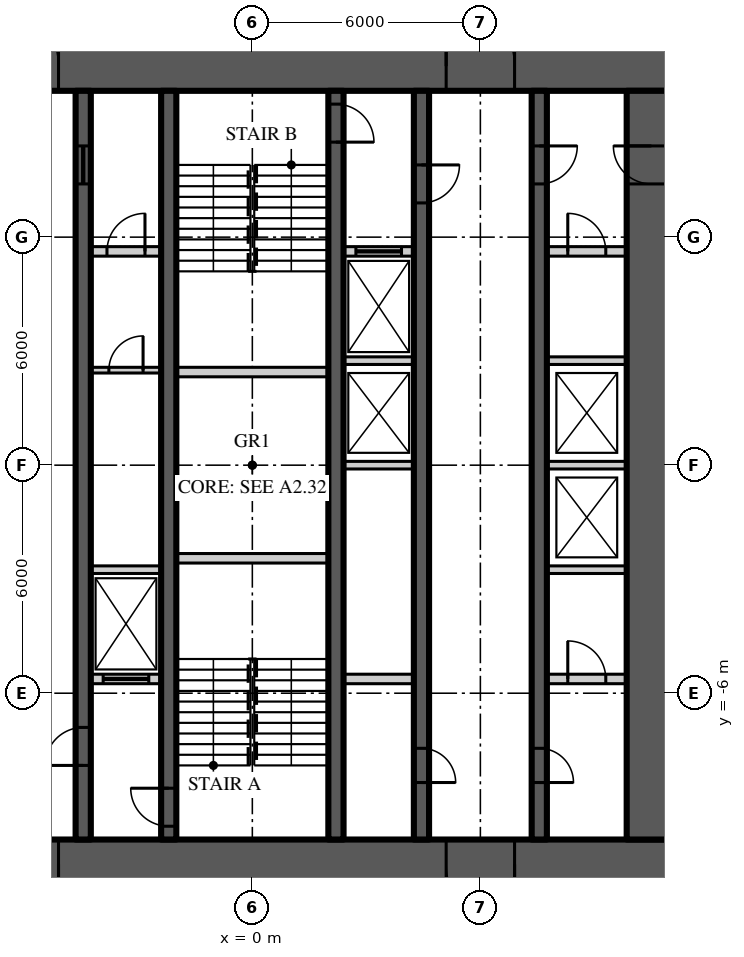
"""IFC4 building model, lengths in metres.
Left out: names, types, materials, properties, quantities, classifications, styles, units other than length and angle.
Written with IfcOpenShell. Run it as: python <this file> out.ifc"""

import sys

from ifc_helpers import new_model, si_unit, direction, frame, frame_2d, origin, place, context, subcontext, project, spatial, rectangle, extrude, element, fill, save


model = new_model("IFC4")
c1 = context("Model", 3, precision=1e-05, world=origin(), true_north=direction((0.0, 1.0)))
c2 = subcontext(c1, "Body", "Model", "MODEL_VIEW")
j1 = project(units=[si_unit("LENGTHUNIT", "METRE"), si_unit("PLANEANGLEUNIT", "RADIAN")], contexts=[c1])
p1 = place(None, origin())
s1 = spatial("IfcSite", under=j1, at=p1, CompositionType="ELEMENT")
p2 = place(p1, origin())
s2 = spatial("IfcBuilding", under=s1, at=p2, CompositionType="ELEMENT")
p3 = place(p2, frame((0.0, 0.0, 240.0)))
s3 = spatial("IfcBuildingStorey", under=s2, at=p3, CompositionType="ELEMENT", Elevation=240.0)
p4 = place(p3, frame((-11.15, 10.5, 0.0), z_axis=(0.0, 0.0, 1.0), x_axis=(1.0, 0.0, 0.0)))
e1 = element("IfcWall", 1, at=p4, inside=s3, PredefinedType="SHEAR", context=c2, shape_type="SweptSolid", body=[
    extrude(rectangle(XDim=22.3, YDim=1.3, at=frame_2d((11.15, 0.0))), origin(), (0.0, 0.0, 1.0), 3.9),
])
p5 = place(p4, frame((4.25, 0.0, 0.0)))
e2 = element("IfcOpeningElement", 2, at=p5, cuts=e1, PredefinedType="OPENING", context=c2, shape_type="SweptSolid", body=[
    extrude(rectangle(XDim=1.8, YDim=2.2, at=frame_2d((0.9, 1.1))), frame((0.0, 0.66, 0.0), z_axis=(0.0, -1.0, 0.0), x_axis=(1.0, 0.0, 0.0)), (0.0, 0.0, 1.0), 1.32),
])
p6 = place(p4, frame((16.25, 0.0, 0.0)))
e3 = element("IfcOpeningElement", 3, at=p6, cuts=e1, PredefinedType="OPENING", context=c2, shape_type="SweptSolid", body=[
    extrude(rectangle(XDim=1.8, YDim=2.2, at=frame_2d((0.9, 1.1))), frame((0.0, 0.66, 0.0), z_axis=(0.0, -1.0, 0.0), x_axis=(1.0, 0.0, 0.0)), (0.0, 0.0, 1.0), 1.32),
])
p7 = place(p3, frame((11.15, -10.5, 0.0), z_axis=(0.0, 0.0, 1.0), x_axis=(-1.0, 0.0, 0.0)))
e4 = element("IfcWall", 4, at=p7, inside=s3, PredefinedType="SHEAR", context=c2, shape_type="SweptSolid", body=[
    extrude(rectangle(XDim=22.3, YDim=1.3, at=frame_2d((11.15, 0.0))), origin(), (0.0, 0.0, 1.0), 3.9),
])
p8 = place(p7, frame((16.25, 0.0, 0.0)))
e5 = element("IfcOpeningElement", 5, at=p8, cuts=e4, PredefinedType="OPENING", context=c2, shape_type="SweptSolid", body=[
    extrude(rectangle(XDim=1.8, YDim=2.2, at=frame_2d((0.9, 1.1))), frame((0.0, 0.66, 0.0), z_axis=(0.0, -1.0, 0.0), x_axis=(1.0, 0.0, 0.0)), (0.0, 0.0, 1.0), 1.32),
])
p9 = place(p7, frame((4.25, 0.0, 0.0)))
e6 = element("IfcOpeningElement", 6, at=p9, cuts=e4, PredefinedType="OPENING", context=c2, shape_type="SweptSolid", body=[
    extrude(rectangle(XDim=1.8, YDim=2.2, at=frame_2d((0.9, 1.1))), frame((0.0, 0.66, 0.0), z_axis=(0.0, -1.0, 0.0), x_axis=(1.0, 0.0, 0.0)), (0.0, 0.0, 1.0), 1.32),
])
p10 = place(p3, frame((10.5, -9.85, 0.0), z_axis=(0.0, 0.0, 1.0), x_axis=(0.0, 1.0, 0.0)))
e7 = element("IfcWall", 7, at=p10, inside=s3, PredefinedType="SHEAR", context=c2, shape_type="SweptSolid", body=[
    extrude(rectangle(XDim=19.7, YDim=1.3, at=frame_2d((9.85, 0.0))), origin(), (0.0, 0.0, 1.0), 3.9),
])
p11 = place(p10, frame((17.25, 0.0, 0.0)))
e8 = element("IfcOpeningElement", 8, at=p11, cuts=e7, PredefinedType="OPENING", context=c2, shape_type="SweptSolid", body=[
    extrude(rectangle(XDim=1.0, YDim=2.2, at=frame_2d((0.5, 1.1))), frame((0.0, 0.66, 0.0), z_axis=(0.0, -1.0, 0.0), x_axis=(1.0, 0.0, 0.0)), (0.0, 0.0, 1.0), 1.32),
])
p12 = place(p3, frame((7.55, 9.85, 0.0), z_axis=(0.0, 0.0, 1.0), x_axis=(0.0, -1.0, 0.0)))
e9 = element("IfcWall", 9, at=p12, inside=s3, PredefinedType="SHEAR", context=c2, shape_type="SweptSolid", body=[
    extrude(rectangle(XDim=19.7, YDim=0.4, at=frame_2d((9.85, 0.0))), origin(), (0.0, 0.0, 1.0), 3.9),
])
p13 = place(p12, frame((1.45, 0.0, 0.0)))
e10 = element("IfcOpeningElement", 10, at=p13, cuts=e9, PredefinedType="OPENING", context=c2, shape_type="SweptSolid", body=[
    extrude(rectangle(XDim=1.0, YDim=2.2, at=frame_2d((0.5, 1.1))), frame((0.0, 0.21, 0.0), z_axis=(0.0, -1.0, 0.0), x_axis=(1.0, 0.0, 0.0)), (0.0, 0.0, 1.0), 0.42),
])
p14 = place(p12, frame((17.3, 0.0, 0.0)))
e11 = element("IfcOpeningElement", 11, at=p14, cuts=e9, PredefinedType="OPENING", context=c2, shape_type="SweptSolid", body=[
    extrude(rectangle(XDim=0.9, YDim=2.1, at=frame_2d((0.45, 1.05))), frame((0.0, 0.21, 0.0), z_axis=(0.0, -1.0, 0.0), x_axis=(1.0, 0.0, 0.0)), (0.0, 0.0, 1.0), 0.42),
])
p15 = place(p3, frame((-4.45, -9.85, 0.0), z_axis=(0.0, 0.0, 1.0), x_axis=(0.0, 1.0, 0.0)))
e12 = element("IfcWall", 12, at=p15, inside=s3, PredefinedType="SHEAR", context=c2, shape_type="SweptSolid", body=[
    extrude(rectangle(XDim=19.7, YDim=0.4, at=frame_2d((9.85, 0.0))), origin(), (0.0, 0.0, 1.0), 3.9),
])
p16 = place(p15, frame((1.95, 0.0, 0.0)))
e13 = element("IfcOpeningElement", 13, at=p16, cuts=e12, PredefinedType="OPENING", context=c2, shape_type="SweptSolid", body=[
    extrude(rectangle(XDim=1.0, YDim=2.2, at=frame_2d((0.5, 1.1))), frame((0.0, 0.21, 0.0), z_axis=(0.0, -1.0, 0.0), x_axis=(1.0, 0.0, 0.0)), (0.0, 0.0, 1.0), 0.42),
])
p17 = place(p15, frame((17.25, 0.0, 0.0)))
e14 = element("IfcOpeningElement", 14, at=p17, cuts=e12, PredefinedType="OPENING", context=c2, shape_type="SweptSolid", body=[
    extrude(rectangle(XDim=1.0, YDim=2.1, at=frame_2d((0.5, 1.05))), frame((0.0, 0.21, 0.0), z_axis=(0.0, -1.0, 0.0), x_axis=(1.0, 0.0, 0.0)), (0.0, 0.0, 1.0), 0.42),
])
p18 = place(p3, frame((4.45, 9.85, 0.0), z_axis=(0.0, 0.0, 1.0), x_axis=(0.0, -1.0, 0.0)))
e15 = element("IfcWall", 15, at=p18, inside=s3, PredefinedType="SHEAR", context=c2, shape_type="SweptSolid", body=[
    extrude(rectangle(XDim=19.7, YDim=0.4, at=frame_2d((9.85, 0.0))), origin(), (0.0, 0.0, 1.0), 3.9),
])
p19 = place(p18, frame((1.95, 0.0, 0.0)))
e16 = element("IfcOpeningElement", 16, at=p19, cuts=e15, PredefinedType="OPENING", context=c2, shape_type="SweptSolid", body=[
    extrude(rectangle(XDim=1.0, YDim=2.2, at=frame_2d((0.5, 1.1))), frame((0.0, 0.21, 0.0), z_axis=(0.0, -1.0, 0.0), x_axis=(1.0, 0.0, 0.0)), (0.0, 0.0, 1.0), 0.42),
])
p20 = place(p18, frame((17.3, 0.0, 0.0)))
e17 = element("IfcOpeningElement", 17, at=p20, cuts=e15, PredefinedType="OPENING", context=c2, shape_type="SweptSolid", body=[
    extrude(rectangle(XDim=0.9, YDim=2.1, at=frame_2d((0.45, 1.05))), frame((0.0, 0.21, 0.0), z_axis=(0.0, -1.0, 0.0), x_axis=(1.0, 0.0, 0.0)), (0.0, 0.0, 1.0), 0.42),
])
p21 = place(p3, frame((-2.2, -9.85, 0.0), z_axis=(0.0, 0.0, 1.0), x_axis=(0.0, 1.0, 0.0)))
e18 = element("IfcWall", 18, at=p21, inside=s3, PredefinedType="SHEAR", context=c2, shape_type="SweptSolid", body=[
    extrude(rectangle(XDim=19.7, YDim=0.4, at=frame_2d((9.85, 0.0))), origin(), (0.0, 0.0, 1.0), 3.9),
])
p22 = place(p21, frame((0.35, 0.0, 0.0)))
e19 = element("IfcOpeningElement", 19, at=p22, cuts=e18, PredefinedType="OPENING", context=c2, shape_type="SweptSolid", body=[
    extrude(rectangle(XDim=1.0, YDim=2.2, at=frame_2d((0.5, 1.1))), frame((0.0, 0.21, 0.0), z_axis=(0.0, -1.0, 0.0), x_axis=(1.0, 0.0, 0.0)), (0.0, 0.0, 1.0), 0.42),
])
p23 = place(p3, frame((2.2, 9.85, 0.0), z_axis=(0.0, 0.0, 1.0), x_axis=(0.0, -1.0, 0.0)))
e20 = element("IfcWall", 20, at=p23, inside=s3, PredefinedType="SHEAR", context=c2, shape_type="SweptSolid", body=[
    extrude(rectangle(XDim=19.7, YDim=0.4, at=frame_2d((9.85, 0.0))), origin(), (0.0, 0.0, 1.0), 3.9),
])
p24 = place(p23, frame((0.35, 0.0, 0.0)))
e21 = element("IfcOpeningElement", 21, at=p24, cuts=e20, PredefinedType="OPENING", context=c2, shape_type="SweptSolid", body=[
    extrude(rectangle(XDim=1.0, YDim=2.2, at=frame_2d((0.5, 1.1))), frame((0.0, 0.21, 0.0), z_axis=(0.0, -1.0, 0.0), x_axis=(1.0, 0.0, 0.0)), (0.0, 0.0, 1.0), 0.42),
])
p25 = place(p3, frame((-4.25, 5.625, 0.0), z_axis=(0.0, 0.0, 1.0), x_axis=(1.0, 0.0, 0.0)))
e22 = element("IfcWall", 22, at=p25, inside=s3, PredefinedType="SOLIDWALL", context=c2, shape_type="SweptSolid", body=[
    extrude(rectangle(XDim=1.85, YDim=0.25, at=frame_2d((0.925, 0.0))), origin(), (0.0, 0.0, 1.0), 3.7),
])
p26 = place(p25, frame((0.425, 0.0, 0.0)))
e23 = element("IfcOpeningElement", 23, at=p26, cuts=e22, PredefinedType="OPENING", context=c2, shape_type="SweptSolid", body=[
    extrude(rectangle(XDim=1.0, YDim=2.2, at=frame_2d((0.5, 1.1))), frame((0.0, 0.135, 0.0), z_axis=(0.0, -1.0, 0.0), x_axis=(1.0, 0.0, 0.0)), (0.0, 0.0, 1.0), 0.27),
])
p27 = place(p3, frame((2.4, 5.625, 0.0), z_axis=(0.0, 0.0, 1.0), x_axis=(1.0, 0.0, 0.0)))
e24 = element("IfcWall", 24, at=p27, inside=s3, PredefinedType="SOLIDWALL", context=c2, shape_type="SweptSolid", body=[
    extrude(rectangle(XDim=1.85, YDim=0.25, at=frame_2d((0.925, 0.0))), origin(), (0.0, 0.0, 1.0), 3.7),
])
p28 = place(p27, frame((0.325, 0.0, 0.0)))
e25 = element("IfcOpeningElement", 25, at=p28, cuts=e24, PredefinedType="OPENING", context=c2, shape_type="SweptSolid", body=[
    extrude(rectangle(XDim=1.2, YDim=2.2, at=frame_2d((0.6, 1.1))), frame((0.0, 0.135, 0.0), z_axis=(0.0, -1.0, 0.0), x_axis=(1.0, 0.0, 0.0)), (0.0, 0.0, 1.0), 0.27),
])
p29 = place(p3, frame((7.75, 5.625, 0.0), z_axis=(0.0, 0.0, 1.0), x_axis=(1.0, 0.0, 0.0)))
e26 = element("IfcWall", 26, at=p29, inside=s3, PredefinedType="SOLIDWALL", context=c2, shape_type="SweptSolid", body=[
    extrude(rectangle(XDim=2.1, YDim=0.25, at=frame_2d((1.05, 0.0))), origin(), (0.0, 0.0, 1.0), 3.7),
])
p30 = place(p29, frame((0.55, 0.0, 0.0)))
e27 = element("IfcOpeningElement", 27, at=p30, cuts=e26, PredefinedType="OPENING", context=c2, shape_type="SweptSolid", body=[
    extrude(rectangle(XDim=1.0, YDim=2.2, at=frame_2d((0.5, 1.1))), frame((0.0, 0.135, 0.0), z_axis=(0.0, -1.0, 0.0), x_axis=(1.0, 0.0, 0.0)), (0.0, 0.0, 1.0), 0.27),
])
p31 = place(p3, frame((-4.25, -5.625, 0.0), z_axis=(0.0, 0.0, 1.0), x_axis=(1.0, 0.0, 0.0)))
e28 = element("IfcWall", 28, at=p31, inside=s3, PredefinedType="SOLIDWALL", context=c2, shape_type="SweptSolid", body=[
    extrude(rectangle(XDim=1.85, YDim=0.25, at=frame_2d((0.925, 0.0))), origin(), (0.0, 0.0, 1.0), 3.7),
])
p32 = place(p31, frame((0.325, 0.0, 0.0)))
e29 = element("IfcOpeningElement", 29, at=p32, cuts=e28, PredefinedType="OPENING", context=c2, shape_type="SweptSolid", body=[
    extrude(rectangle(XDim=1.2, YDim=2.2, at=frame_2d((0.6, 1.1))), frame((0.0, 0.135, 0.0), z_axis=(0.0, -1.0, 0.0), x_axis=(1.0, 0.0, 0.0)), (0.0, 0.0, 1.0), 0.27),
])
p33 = place(p3, frame((2.4, -5.625, 0.0), z_axis=(0.0, 0.0, 1.0), x_axis=(1.0, 0.0, 0.0)))
e30 = element("IfcWall", 30, at=p33, inside=s3, PredefinedType="SOLIDWALL", context=c2, shape_type="SweptSolid", body=[
    extrude(rectangle(XDim=1.85, YDim=0.25, at=frame_2d((0.925, 0.0))), origin(), (0.0, 0.0, 1.0), 3.7),
])
p34 = place(p3, frame((7.75, -5.625, 0.0), z_axis=(0.0, 0.0, 1.0), x_axis=(1.0, 0.0, 0.0)))
e31 = element("IfcWall", 31, at=p34, inside=s3, PredefinedType="SOLIDWALL", context=c2, shape_type="SweptSolid", body=[
    extrude(rectangle(XDim=2.1, YDim=0.25, at=frame_2d((1.05, 0.0))), origin(), (0.0, 0.0, 1.0), 3.7),
])
p35 = place(p34, frame((0.55, 0.0, 0.0)))
e32 = element("IfcOpeningElement", 32, at=p35, cuts=e31, PredefinedType="OPENING", context=c2, shape_type="SweptSolid", body=[
    extrude(rectangle(XDim=1.0, YDim=2.2, at=frame_2d((0.5, 1.1))), frame((0.0, 0.135, 0.0), z_axis=(0.0, -1.0, 0.0), x_axis=(1.0, 0.0, 0.0)), (0.0, 0.0, 1.0), 0.27),
])
for number, where, z_axis, x_axis in (
    (33, (-2.0, -2.45, 0.0), (0.0, 0.0, 1.0), (1.0, 0.0, 0.0)),
    (34, (-2.0, 2.45, 0.0), (0.0, 0.0, 1.0), (1.0, 0.0, 0.0)),
):
    element("IfcWall", number, at=place(p3, frame(where, z_axis=z_axis, x_axis=x_axis)), inside=s3, PredefinedType="SOLIDWALL", context=c2, shape_type="SweptSolid", body=[
        extrude(rectangle(XDim=4.0, YDim=0.25, at=frame_2d((2.0, 0.0))), origin(), (0.0, 0.0, 1.0), 3.7),
    ])
p36 = place(p3, frame((-4.25, -2.75, 0.0), z_axis=(0.0, 0.0, 1.0), x_axis=(1.0, 0.0, 0.0)))
e35 = element("IfcWall", 35, at=p36, inside=s3, PredefinedType="SOLIDWALL", context=c2, shape_type="SweptSolid", body=[
    extrude(rectangle(XDim=1.85, YDim=0.2, at=frame_2d((0.925, 0.0))), origin(), (0.0, 0.0, 1.0), 3.7),
])
p37 = place(p3, frame((7.75, -2.75, 0.0), z_axis=(0.0, 0.0, 1.0), x_axis=(1.0, 0.0, 0.0)))
e36 = element("IfcWall", 36, at=p37, inside=s3, PredefinedType="SOLIDWALL", context=c2, shape_type="SweptSolid", body=[
    extrude(rectangle(XDim=2.1, YDim=0.2, at=frame_2d((1.05, 0.0))), origin(), (0.0, 0.0, 1.0), 3.7),
])
p38 = place(p3, frame((2.4, 0.0, 0.0), z_axis=(0.0, 0.0, 1.0), x_axis=(1.0, 0.0, 0.0)))
e37 = element("IfcWall", 37, at=p38, inside=s3, PredefinedType="SOLIDWALL", context=c2, shape_type="SweptSolid", body=[
    extrude(rectangle(XDim=1.85, YDim=0.2, at=frame_2d((0.925, 0.0))), origin(), (0.0, 0.0, 1.0), 3.7),
])
p39 = place(p3, frame((7.75, 0.0, 0.0), z_axis=(0.0, 0.0, 1.0), x_axis=(1.0, 0.0, 0.0)))
e38 = element("IfcWall", 38, at=p39, inside=s3, PredefinedType="SOLIDWALL", context=c2, shape_type="SweptSolid", body=[
    extrude(rectangle(XDim=2.1, YDim=0.2, at=frame_2d((1.05, 0.0))), origin(), (0.0, 0.0, 1.0), 3.7),
])
p40 = place(p3, frame((2.4, 2.75, 0.0), z_axis=(0.0, 0.0, 1.0), x_axis=(1.0, 0.0, 0.0)))
e39 = element("IfcWall", 39, at=p40, inside=s3, PredefinedType="SOLIDWALL", context=c2, shape_type="SweptSolid", body=[
    extrude(rectangle(XDim=1.85, YDim=0.2, at=frame_2d((0.925, 0.0))), origin(), (0.0, 0.0, 1.0), 3.7),
])
p41 = place(p3, frame((7.75, 2.75, 0.0), z_axis=(0.0, 0.0, 1.0), x_axis=(1.0, 0.0, 0.0)))
e40 = element("IfcWall", 40, at=p41, inside=s3, PredefinedType="SOLIDWALL", context=c2, shape_type="SweptSolid", body=[
    extrude(rectangle(XDim=2.1, YDim=0.2, at=frame_2d((1.05, 0.0))), origin(), (0.0, 0.0, 1.0), 3.7),
])
p42 = place(p3, frame((-4.25, 2.5, 0.0), z_axis=(0.0, 0.0, 1.0), x_axis=(1.0, 0.0, 0.0)))
e41 = element("IfcWall", 41, at=p42, inside=s3, PredefinedType="SOLIDWALL", context=c2, shape_type="SweptSolid", body=[
    extrude(rectangle(XDim=1.85, YDim=0.15, at=frame_2d((0.925, 0.0))), origin(), (0.0, 0.0, 1.0), 3.77),
])
p43 = place(p42, frame((0.475, 0.0, 0.0)))
e42 = element("IfcOpeningElement", 42, at=p43, cuts=e41, PredefinedType="OPENING", context=c2, shape_type="SweptSolid", body=[
    extrude(rectangle(XDim=0.9, YDim=2.1, at=frame_2d((0.45, 1.05))), frame((0.0, 0.085, 0.0), z_axis=(0.0, -1.0, 0.0), x_axis=(1.0, 0.0, 0.0)), (0.0, 0.0, 1.0), 0.17),
])
p44 = place(p5, origin())
e43 = element("IfcDoor", 43, at=p44, inside=s3, OperationType="DOUBLE_DOOR_DOUBLE_SWING", PredefinedType="DOOR", context=c2, shape_type="SweptSolid", body=[
    extrude(rectangle(XDim=1.8, YDim=2.2, at=frame_2d((0.9, 1.1))), frame((0.0, 0.025, 0.0), z_axis=(0.0, -1.0, 0.0), x_axis=(1.0, 0.0, 0.0)), (0.0, 0.0, 1.0), 0.05),
])
fill(e2, e43)
p45 = place(p8, origin())
e44 = element("IfcDoor", 44, at=p45, inside=s3, OperationType="DOUBLE_DOOR_DOUBLE_SWING", PredefinedType="DOOR", context=c2, shape_type="SweptSolid", body=[
    extrude(rectangle(XDim=1.8, YDim=2.2, at=frame_2d((0.9, 1.1))), frame((0.0, 0.025, 0.0), z_axis=(0.0, -1.0, 0.0), x_axis=(1.0, 0.0, 0.0)), (0.0, 0.0, 1.0), 0.05),
])
fill(e5, e44)
p46 = place(p6, origin())
e45 = element("IfcDoor", 45, at=p46, inside=s3, OperationType="DOUBLE_DOOR_DOUBLE_SWING", PredefinedType="DOOR", context=c2, shape_type="SweptSolid", body=[
    extrude(rectangle(XDim=1.8, YDim=2.2, at=frame_2d((0.9, 1.1))), frame((0.0, 0.025, 0.0), z_axis=(0.0, -1.0, 0.0), x_axis=(1.0, 0.0, 0.0)), (0.0, 0.0, 1.0), 0.05),
])
fill(e3, e45)
p47 = place(p9, origin())
e46 = element("IfcDoor", 46, at=p47, inside=s3, OperationType="DOUBLE_DOOR_DOUBLE_SWING", PredefinedType="DOOR", context=c2, shape_type="SweptSolid", body=[
    extrude(rectangle(XDim=1.8, YDim=2.2, at=frame_2d((0.9, 1.1))), frame((0.0, 0.025, 0.0), z_axis=(0.0, -1.0, 0.0), x_axis=(1.0, 0.0, 0.0)), (0.0, 0.0, 1.0), 0.05),
])
fill(e6, e46)
p48 = place(p13, origin())
e47 = element("IfcDoor", 47, at=p48, inside=s3, OperationType="SINGLE_SWING_LEFT", PredefinedType="DOOR", context=c2, shape_type="SweptSolid", body=[
    extrude(rectangle(XDim=1.0, YDim=2.2, at=frame_2d((0.5, 1.1))), frame((0.0, 0.025, 0.0), z_axis=(0.0, -1.0, 0.0), x_axis=(1.0, 0.0, 0.0)), (0.0, 0.0, 1.0), 0.05),
])
fill(e10, e47)
p49 = place(p11, origin())
e48 = element("IfcDoor", 48, at=p49, inside=s3, OperationType="SINGLE_SWING_RIGHT", PredefinedType="DOOR", context=c2, shape_type="SweptSolid", body=[
    extrude(rectangle(XDim=1.0, YDim=2.2, at=frame_2d((0.5, 1.1))), frame((0.0, 0.025, 0.0), z_axis=(0.0, -1.0, 0.0), x_axis=(1.0, 0.0, 0.0)), (0.0, 0.0, 1.0), 0.05),
])
fill(e8, e48)
p50 = place(p16, origin())
e49 = element("IfcDoor", 49, at=p50, inside=s3, OperationType="SINGLE_SWING_LEFT", PredefinedType="DOOR", context=c2, shape_type="SweptSolid", body=[
    extrude(rectangle(XDim=1.0, YDim=2.2, at=frame_2d((0.5, 1.1))), frame((0.0, 0.025, 0.0), z_axis=(0.0, -1.0, 0.0), x_axis=(1.0, 0.0, 0.0)), (0.0, 0.0, 1.0), 0.05),
])
fill(e13, e49)
p51 = place(p22, origin())
e50 = element("IfcDoor", 50, at=p51, inside=s3, OperationType="SINGLE_SWING_RIGHT", PredefinedType="DOOR", context=c2, shape_type="SweptSolid", body=[
    extrude(rectangle(XDim=1.0, YDim=2.2, at=frame_2d((0.5, 1.1))), frame((0.0, 0.025, 0.0), z_axis=(0.0, -1.0, 0.0), x_axis=(1.0, 0.0, 0.0)), (0.0, 0.0, 1.0), 0.05),
])
fill(e19, e50)
p52 = place(p19, origin())
e51 = element("IfcDoor", 51, at=p52, inside=s3, OperationType="SINGLE_SWING_LEFT", PredefinedType="DOOR", context=c2, shape_type="SweptSolid", body=[
    extrude(rectangle(XDim=1.0, YDim=2.2, at=frame_2d((0.5, 1.1))), frame((0.0, 0.025, 0.0), z_axis=(0.0, -1.0, 0.0), x_axis=(1.0, 0.0, 0.0)), (0.0, 0.0, 1.0), 0.05),
])
fill(e16, e51)
p53 = place(p24, origin())
e52 = element("IfcDoor", 52, at=p53, inside=s3, OperationType="SINGLE_SWING_RIGHT", PredefinedType="DOOR", context=c2, shape_type="SweptSolid", body=[
    extrude(rectangle(XDim=1.0, YDim=2.2, at=frame_2d((0.5, 1.1))), frame((0.0, 0.025, 0.0), z_axis=(0.0, -1.0, 0.0), x_axis=(1.0, 0.0, 0.0)), (0.0, 0.0, 1.0), 0.05),
])
fill(e21, e52)
p54 = place(p17, origin())
e53 = element("IfcDoor", 53, at=p54, inside=s3, OperationType="SLIDING_TO_LEFT", PredefinedType="DOOR", context=c2, shape_type="SweptSolid", body=[
    extrude(rectangle(XDim=1.0, YDim=2.1, at=frame_2d((0.5, 1.05))), frame((0.0, 0.025, 0.0), z_axis=(0.0, -1.0, 0.0), x_axis=(1.0, 0.0, 0.0)), (0.0, 0.0, 1.0), 0.05),
])
fill(e14, e53)
p55 = place(p14, origin())
e54 = element("IfcDoor", 54, at=p55, inside=s3, OperationType="SINGLE_SWING_RIGHT", PredefinedType="DOOR", context=c2, shape_type="SweptSolid", body=[
    extrude(rectangle(XDim=0.9, YDim=2.1, at=frame_2d((0.45, 1.05))), frame((0.0, 0.025, 0.0), z_axis=(0.0, -1.0, 0.0), x_axis=(1.0, 0.0, 0.0)), (0.0, 0.0, 1.0), 0.05),
])
fill(e11, e54)
p56 = place(p20, origin())
e55 = element("IfcDoor", 55, at=p56, inside=s3, OperationType="SINGLE_SWING_RIGHT", PredefinedType="DOOR", context=c2, shape_type="SweptSolid", body=[
    extrude(rectangle(XDim=0.9, YDim=2.1, at=frame_2d((0.45, 1.05))), frame((0.0, 0.025, 0.0), z_axis=(0.0, -1.0, 0.0), x_axis=(1.0, 0.0, 0.0)), (0.0, 0.0, 1.0), 0.05),
])
fill(e17, e55)
p57 = place(p32, origin())
e56 = element("IfcDoor", 56, at=p57, inside=s3, OperationType="SLIDING_TO_LEFT", PredefinedType="DOOR", context=c2, shape_type="SweptSolid", body=[
    extrude(rectangle(XDim=1.2, YDim=2.2, at=frame_2d((0.6, 1.1))), frame((0.0, 0.025, 0.0), z_axis=(0.0, -1.0, 0.0), x_axis=(1.0, 0.0, 0.0)), (0.0, 0.0, 1.0), 0.05),
])
fill(e29, e56)
p58 = place(p28, origin())
e57 = element("IfcDoor", 57, at=p58, inside=s3, OperationType="SLIDING_TO_LEFT", PredefinedType="DOOR", context=c2, shape_type="SweptSolid", body=[
    extrude(rectangle(XDim=1.2, YDim=2.2, at=frame_2d((0.6, 1.1))), frame((0.0, 0.025, 0.0), z_axis=(0.0, -1.0, 0.0), x_axis=(1.0, 0.0, 0.0)), (0.0, 0.0, 1.0), 0.05),
])
fill(e25, e57)
p59 = place(p43, origin())
e58 = element("IfcDoor", 58, at=p59, inside=s3, OperationType="SINGLE_SWING_RIGHT", PredefinedType="DOOR", context=c2, shape_type="SweptSolid", body=[
    extrude(rectangle(XDim=0.9, YDim=2.1, at=frame_2d((0.45, 1.05))), frame((0.0, 0.025, 0.0), z_axis=(0.0, -1.0, 0.0), x_axis=(1.0, 0.0, 0.0)), (0.0, 0.0, 1.0), 0.05),
])
fill(e42, e58)
p60 = place(p26, origin())
e59 = element("IfcDoor", 59, at=p60, inside=s3, OperationType="SINGLE_SWING_RIGHT", PredefinedType="DOOR", context=c2, shape_type="SweptSolid", body=[
    extrude(rectangle(XDim=1.0, YDim=2.2, at=frame_2d((0.5, 1.1))), frame((0.0, 0.025, 0.0), z_axis=(0.0, -1.0, 0.0), x_axis=(1.0, 0.0, 0.0)), (0.0, 0.0, 1.0), 0.05),
])
fill(e23, e59)
p61 = place(p30, origin())
e60 = element("IfcDoor", 60, at=p61, inside=s3, OperationType="SINGLE_SWING_LEFT", PredefinedType="DOOR", context=c2, shape_type="SweptSolid", body=[
    extrude(rectangle(XDim=1.0, YDim=2.2, at=frame_2d((0.5, 1.1))), frame((0.0, 0.025, 0.0), z_axis=(0.0, -1.0, 0.0), x_axis=(1.0, 0.0, 0.0)), (0.0, 0.0, 1.0), 0.05),
])
fill(e27, e60)
p62 = place(p35, origin())
e61 = element("IfcDoor", 61, at=p62, inside=s3, OperationType="SINGLE_SWING_LEFT", PredefinedType="DOOR", context=c2, shape_type="SweptSolid", body=[
    extrude(rectangle(XDim=1.0, YDim=2.2, at=frame_2d((0.5, 1.1))), frame((0.0, 0.025, 0.0), z_axis=(0.0, -1.0, 0.0), x_axis=(1.0, 0.0, 0.0)), (0.0, 0.0, 1.0), 0.05),
])
fill(e32, e61)
save(model, sys.argv[1])
